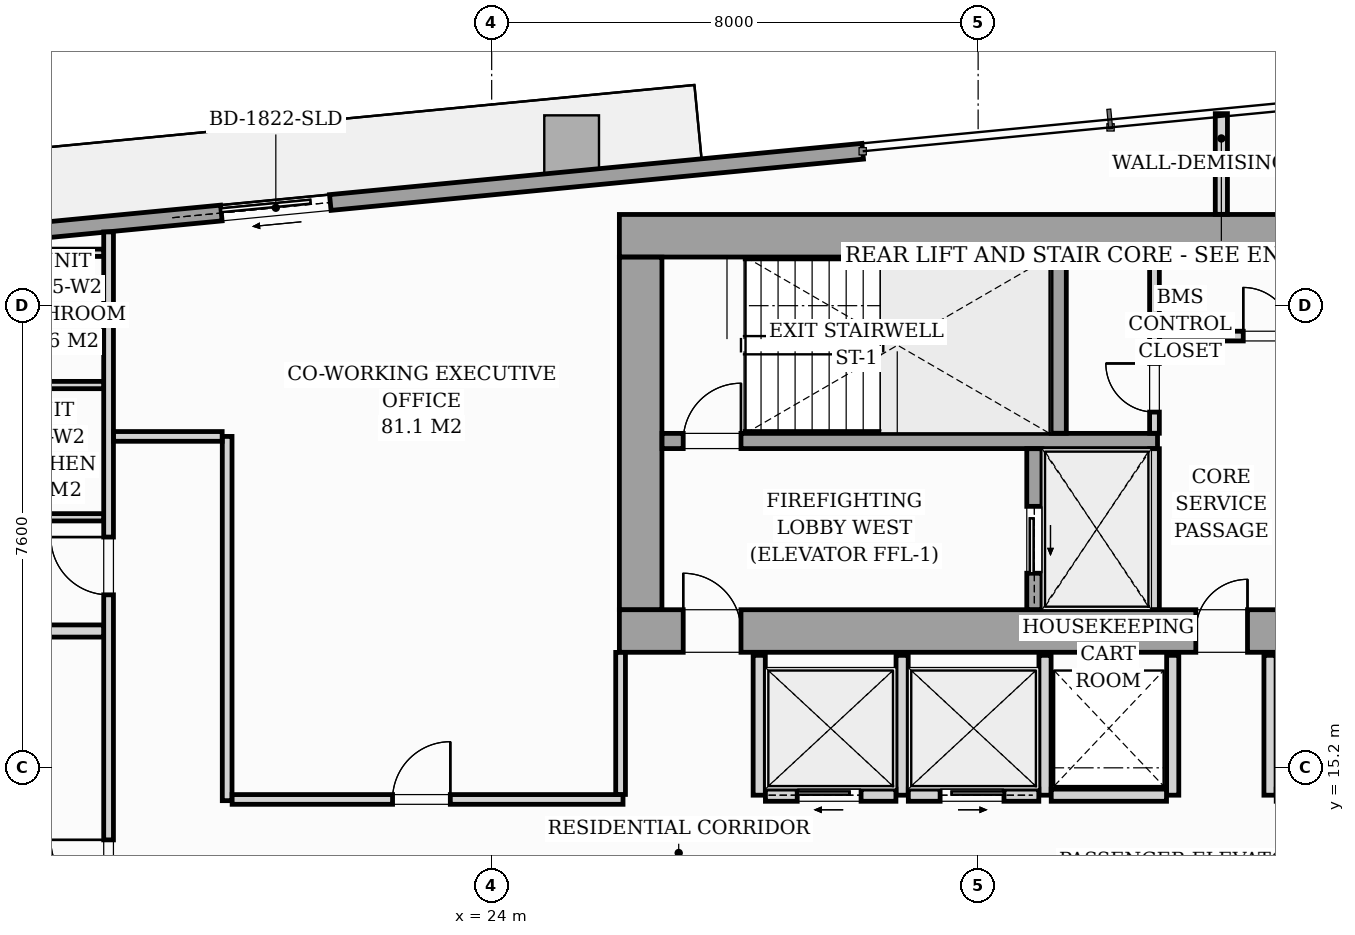
"""IFC4 building model, lengths in metres.
Left out: names, types, materials, properties, quantities, classifications, styles, units other than length and angle.
Written with IfcOpenShell. Run it as: python <this file> out.ifc"""

import sys

from ifc_helpers import new_model, si_unit, direction, frame, frame_2d, origin, origin_2d, place, context, subcontext, project, spatial, rectangle, i_section, extrude, source, transform, mapped, element, fill, save


model = new_model("IFC4")
c1 = context("Model", 3, precision=1e-05, world=origin(), true_north=direction((0.0, 1.0)))
c2 = subcontext(c1, "Body", "Model", "MODEL_VIEW")
j1 = project(units=[si_unit("LENGTHUNIT", "METRE"), si_unit("PLANEANGLEUNIT", "RADIAN")], contexts=[c1])
p1 = place(None, origin())
s1 = spatial("IfcSite", under=j1, at=p1, CompositionType="ELEMENT")
p2 = place(p1, origin())
s2 = spatial("IfcBuilding", under=s1, at=p2, CompositionType="ELEMENT")
p3 = place(p2, frame((0.0, 0.0, 90.6)))
s3 = spatial("IfcBuildingStorey", under=s2, at=p3, CompositionType="ELEMENT", Elevation=90.6)
m1 = source(origin(), c2, "Body", "SweptSolid", [
    extrude(i_section(OverallWidth=0.427, OverallDepth=0.483, WebThickness=0.051, FlangeThickness=0.082, FilletRadius=0.018, at=origin_2d()), origin(), (0.0, 0.0, 1.0), 3.196),
])
for number, where, z_axis, x_axis in (
    (1, (26.4, 17.4, 0.002), (0.0, 0.0, 1.0), (1.0, 0.0, 0.0)),
    (2, (33.12, 17.4, 0.002), (0.0, 0.0, 1.0), (1.0, 0.0, 0.0)),
    (3, (26.4, 24.0, 0.002), (0.0, 0.0, 1.0), (1.0, 0.0, 0.0)),
    (4, (33.12, 24.0, 0.002), (0.0, 0.0, 1.0), (1.0, 0.0, 0.0)),
):
    element("IfcColumn", number, at=place(p3, frame(where, z_axis=z_axis, x_axis=x_axis)), inside=s3, PredefinedType="PILASTER", context=c2, shape_type="MappedRepresentation", body=[
        mapped(m1, transform((0.0, 0.0, 0.0), scale=1.0)),
    ])
m2 = source(origin(), c2, "Body", "SweptSolid", [
    extrude(rectangle(XDim=0.9, YDim=1.1, at=origin_2d()), origin(), (0.0, 0.0, 1.0), 3.196),
])
p4 = place(p3, frame((25.315, 25.38, 0.002), z_axis=(0.0, 0.0, 1.0), x_axis=(0.995396198367, 0.09584575252, 0.0)))
e5 = element("IfcColumn", 5, at=p4, inside=s3, PredefinedType="COLUMN", context=c2, shape_type="MappedRepresentation", body=[
    mapped(m2, transform((0.0, 0.0, 0.0), scale=1.0)),
])
p5 = place(p3, frame((11.08, 23.508, 0.0), z_axis=(0.0, 0.0, 1.0), x_axis=(0.995396638587, 0.095841180552, 0.0)))
e6 = element("IfcWall", 6, at=p5, inside=s3, PredefinedType="STANDARD", context=c2, shape_type="SweptSolid", body=[
    extrude(rectangle(XDim=19.11, YDim=0.26, at=frame_2d((9.555, 0.0))), origin(), (0.0, 0.0, 1.0), 2.94),
])
p6 = place(p5, frame((8.514, 0.0, 0.0)))
e7 = element("IfcOpeningElement", 7, at=p6, cuts=e6, PredefinedType="OPENING", context=c2, shape_type="SweptSolid", body=[
    extrude(rectangle(XDim=1.8, YDim=2.06, at=frame_2d((0.9, 1.03))), frame((0.0, 0.14, 0.0), z_axis=(0.0, -1.0, 0.0), x_axis=(1.0, 0.0, 0.0)), (0.0, 0.0, 1.0), 0.28),
])
p7 = place(p5, frame((2.05, 0.0, 0.65)))
e8 = element("IfcOpeningElement", 8, at=p7, cuts=e6, PredefinedType="OPENING", context=c2, shape_type="SweptSolid", body=[
    extrude(rectangle(XDim=1.6, YDim=1.5, at=frame_2d((0.8, 0.75))), frame((0.0, 0.14, 0.0), z_axis=(0.0, -1.0, 0.0), x_axis=(1.0, 0.0, 0.0)), (0.0, 0.0, 1.0), 0.28),
])
p8 = place(p3, frame((26.1, 17.45, 0.0), z_axis=(0.0, 0.0, 1.0), x_axis=(1.0, 0.0, 0.0)))
e9 = element("IfcWall", 9, at=p8, inside=s3, PredefinedType="SHEAR", context=c2, shape_type="SweptSolid", body=[
    extrude(rectangle(XDim=19.8, YDim=0.7, at=frame_2d((9.9, 0.0))), origin(), (0.0, 0.0, 1.0), 3.2),
])
p9 = place(p8, frame((1.05, 0.0, 0.0)))
e10 = element("IfcOpeningElement", 10, at=p9, cuts=e9, PredefinedType="OPENING", context=c2, shape_type="SweptSolid", body=[
    extrude(rectangle(XDim=0.95, YDim=2.06, at=frame_2d((0.475, 1.03))), frame((0.0, 0.36, 0.0), z_axis=(0.0, -1.0, 0.0), x_axis=(1.0, 0.0, 0.0)), (0.0, 0.0, 1.0), 0.72),
])
p10 = place(p8, frame((9.48, 0.0, 0.0)))
e11 = element("IfcOpeningElement", 11, at=p10, cuts=e9, PredefinedType="OPENING", context=c2, shape_type="SweptSolid", body=[
    extrude(rectangle(XDim=0.85, YDim=2.0, at=frame_2d((0.425, 1.0))), frame((0.0, 0.36, 0.0), z_axis=(0.0, -1.0, 0.0), x_axis=(1.0, 0.0, 0.0)), (0.0, 0.0, 1.0), 0.72),
])
p11 = place(p8, frame((17.65, 0.0, 0.0)))
e12 = element("IfcOpeningElement", 12, at=p11, cuts=e9, PredefinedType="OPENING", context=c2, shape_type="SweptSolid", body=[
    extrude(rectangle(XDim=0.95, YDim=2.06, at=frame_2d((0.475, 1.03))), frame((0.0, 0.36, 0.0), z_axis=(0.0, -1.0, 0.0), x_axis=(1.0, 0.0, 0.0)), (0.0, 0.0, 1.0), 0.72),
])
p12 = place(p3, frame((26.1, 23.95, 0.0), z_axis=(0.0, 0.0, 1.0), x_axis=(1.0, 0.0, 0.0)))
e13 = element("IfcWall", 13, at=p12, inside=s3, PredefinedType="SHEAR", context=c2, shape_type="SweptSolid", body=[
    extrude(rectangle(XDim=19.8, YDim=0.7, at=frame_2d((9.9, 0.0))), origin(), (0.0, 0.0, 1.0), 3.2),
])
p13 = place(p3, frame((26.45, 17.802, 0.0), z_axis=(0.0, 0.0, 1.0), x_axis=(0.0, 1.0, 0.0)))
e14 = element("IfcWall", 14, at=p13, inside=s3, PredefinedType="SHEAR", context=c2, shape_type="SweptSolid", body=[
    extrude(rectangle(XDim=5.796, YDim=0.7, at=frame_2d((2.898, 0.0))), origin(), (0.0, 0.0, 1.0), 3.2),
])
p14 = place(p3, frame((26.802, 20.575, 0.0), z_axis=(0.0, 0.0, 1.0), x_axis=(1.0, 0.0, 0.0)))
e15 = element("IfcWall", 15, at=p14, inside=s3, PredefinedType="SOLIDWALL", context=c2, shape_type="SweptSolid", body=[
    extrude(rectangle(XDim=8.148, YDim=0.25, at=frame_2d((4.074, 0.0))), origin(), (0.0, 0.0, 1.0), 3.2),
])
p15 = place(p14, frame((0.348, 0.0, 0.0)))
e16 = element("IfcOpeningElement", 16, at=p15, cuts=e15, PredefinedType="OPENING", context=c2, shape_type="SweptSolid", body=[
    extrude(rectangle(XDim=0.95, YDim=2.06, at=frame_2d((0.475, 1.03))), frame((0.0, 0.135, 0.0), z_axis=(0.0, -1.0, 0.0), x_axis=(1.0, 0.0, 0.0)), (0.0, 0.0, 1.0), 0.27),
])
p16 = place(p3, frame((33.325, 20.702, 0.0), z_axis=(0.0, 0.0, 1.0), x_axis=(0.0, 1.0, 0.0)))
e17 = element("IfcWall", 17, at=p16, inside=s3, PredefinedType="SOLIDWALL", context=c2, shape_type="SweptSolid", body=[
    extrude(rectangle(XDim=2.896, YDim=0.25, at=frame_2d((1.448, 0.0))), origin(), (0.0, 0.0, 1.0), 3.2),
])
p17 = place(p3, frame((32.925, 17.802, 0.0), z_axis=(0.0, 0.0, 1.0), x_axis=(0.0, 1.0, 0.0)))
e18 = element("IfcWall", 18, at=p17, inside=s3, PredefinedType="SOLIDWALL", context=c2, shape_type="SweptSolid", body=[
    extrude(rectangle(XDim=2.646, YDim=0.25, at=frame_2d((1.323, 0.0))), origin(), (0.0, 0.0, 1.0), 3.2),
])
p18 = place(p17, frame((0.598, 0.0, 0.0)))
e19 = element("IfcOpeningElement", 19, at=p18, cuts=e18, PredefinedType="OPENING", context=c2, shape_type="SweptSolid", body=[
    extrude(rectangle(XDim=1.1, YDim=2.08, at=frame_2d((0.55, 1.04))), frame((0.0, 0.135, 0.0), z_axis=(0.0, -1.0, 0.0), x_axis=(1.0, 0.0, 0.0)), (0.0, 0.0, 1.0), 0.27),
])
p19 = place(p3, frame((34.9, 17.802, 0.0), z_axis=(0.0, 0.0, 1.0), x_axis=(0.0, 1.0, 0.0)))
e20 = element("IfcWall", 20, at=p19, inside=s3, PredefinedType="PARTITIONING", context=c2, shape_type="SweptSolid", body=[
    extrude(rectangle(XDim=2.646, YDim=0.16, at=frame_2d((1.323, 0.0))), origin(), (0.0, 0.0, 1.0), 2.94),
])
p20 = place(p3, frame((34.9, 20.702, 0.0), z_axis=(0.0, 0.0, 1.0), x_axis=(0.0, 1.0, 0.0)))
e21 = element("IfcWall", 21, at=p20, inside=s3, PredefinedType="PARTITIONING", context=c2, shape_type="SweptSolid", body=[
    extrude(rectangle(XDim=2.896, YDim=0.16, at=frame_2d((1.448, 0.0))), origin(), (0.0, 0.0, 1.0), 2.94),
])
p21 = place(p20, frame((0.348, 0.0, 0.0)))
e22 = element("IfcOpeningElement", 22, at=p21, cuts=e21, PredefinedType="OPENING", context=c2, shape_type="SweptSolid", body=[
    extrude(rectangle(XDim=0.8, YDim=2.05, at=frame_2d((0.4, 1.025))), frame((0.0, 0.09, 0.0), z_axis=(0.0, -1.0, 0.0), x_axis=(1.0, 0.0, 0.0)), (0.0, 0.0, 1.0), 0.18),
])
p22 = place(p3, frame((34.982, 22.3, 0.0), z_axis=(0.0, 0.0, 1.0), x_axis=(1.0, 0.0, 0.0)))
e23 = element("IfcWall", 23, at=p22, inside=s3, PredefinedType="PARTITIONING", context=c2, shape_type="SweptSolid", body=[
    extrude(rectangle(XDim=3.566, YDim=0.16, at=frame_2d((1.783, 0.0))), origin(), (0.0, 0.0, 1.0), 2.94),
])
p23 = place(p22, frame((1.378, 0.0, 0.0)))
e24 = element("IfcOpeningElement", 24, at=p23, cuts=e23, PredefinedType="OPENING", context=c2, shape_type="SweptSolid", body=[
    extrude(rectangle(XDim=0.8, YDim=2.05, at=frame_2d((0.4, 1.025))), frame((0.0, 0.09, 0.0), z_axis=(0.0, -1.0, 0.0), x_axis=(1.0, 0.0, 0.0)), (0.0, 0.0, 1.0), 0.18),
])
for number, where, z_axis, x_axis in (
    (25, (28.4, 14.75, 0.0), (0.0, 0.0, 1.0), (0.0, 1.0, 0.0)),
    (26, (30.75, 14.75, 0.0), (0.0, 0.0, 1.0), (0.0, 1.0, 0.0)),
    (27, (33.1, 14.75, 0.0), (0.0, 0.0, 1.0), (0.0, 1.0, 0.0)),
):
    element("IfcWall", number, at=place(p3, frame(where, z_axis=z_axis, x_axis=x_axis)), inside=s3, PredefinedType="PARTITIONING", context=c2, shape_type="SweptSolid", body=[
        extrude(rectangle(XDim=2.3, YDim=0.2, at=frame_2d((1.15, 0.0))), origin(), (0.0, 0.0, 1.0), 2.94),
    ])
p24 = place(p3, frame((28.502, 14.75, 0.0), z_axis=(0.0, 0.0, 1.0), x_axis=(1.0, 0.0, 0.0)))
e28 = element("IfcWall", 28, at=p24, inside=s3, PredefinedType="PARTITIONING", context=c2, shape_type="SweptSolid", body=[
    extrude(rectangle(XDim=2.146, YDim=0.2, at=frame_2d((1.073, 0.0))), origin(), (0.0, 0.0, 1.0), 2.94),
])
p25 = place(p24, frame((0.523, 0.0, 0.0)))
e29 = element("IfcOpeningElement", 29, at=p25, cuts=e28, PredefinedType="OPENING", context=c2, shape_type="SweptSolid", body=[
    extrude(rectangle(XDim=1.05, YDim=2.08, at=frame_2d((0.525, 1.04))), frame((0.0, 0.11, 0.0), z_axis=(0.0, -1.0, 0.0), x_axis=(1.0, 0.0, 0.0)), (0.0, 0.0, 1.0), 0.22),
])
p26 = place(p3, frame((30.852, 14.75, 0.0), z_axis=(0.0, 0.0, 1.0), x_axis=(1.0, 0.0, 0.0)))
e30 = element("IfcWall", 30, at=p26, inside=s3, PredefinedType="PARTITIONING", context=c2, shape_type="SweptSolid", body=[
    extrude(rectangle(XDim=2.146, YDim=0.2, at=frame_2d((1.073, 0.0))), origin(), (0.0, 0.0, 1.0), 2.94),
])
p27 = place(p26, frame((0.523, 0.0, 0.0)))
e31 = element("IfcOpeningElement", 31, at=p27, cuts=e30, PredefinedType="OPENING", context=c2, shape_type="SweptSolid", body=[
    extrude(rectangle(XDim=1.05, YDim=2.08, at=frame_2d((0.525, 1.04))), frame((0.0, 0.11, 0.0), z_axis=(0.0, -1.0, 0.0), x_axis=(1.0, 0.0, 0.0)), (0.0, 0.0, 1.0), 0.22),
])
p28 = place(p3, frame((35.2, 14.75, 0.0), z_axis=(0.0, 0.0, 1.0), x_axis=(0.0, 1.0, 0.0)))
e32 = element("IfcWall", 32, at=p28, inside=s3, PredefinedType="PARTITIONING", context=c2, shape_type="SweptSolid", body=[
    extrude(rectangle(XDim=2.3, YDim=0.2, at=frame_2d((1.15, 0.0))), origin(), (0.0, 0.0, 1.0), 2.94),
])
p29 = place(p3, frame((33.202, 14.75, 0.0), z_axis=(0.0, 0.0, 1.0), x_axis=(1.0, 0.0, 0.0)))
e33 = element("IfcWall", 33, at=p29, inside=s3, PredefinedType="PARTITIONING", context=c2, shape_type="SweptSolid", body=[
    extrude(rectangle(XDim=1.896, YDim=0.2, at=frame_2d((0.948, 0.0))), origin(), (0.0, 0.0, 1.0), 2.94),
])
p30 = place(p3, frame((36.8, 14.75, 0.0), z_axis=(0.0, 0.0, 1.0), x_axis=(0.0, 1.0, 0.0)))
e34 = element("IfcWall", 34, at=p30, inside=s3, PredefinedType="PARTITIONING", context=c2, shape_type="SweptSolid", body=[
    extrude(rectangle(XDim=2.3, YDim=0.2, at=frame_2d((1.15, 0.0))), origin(), (0.0, 0.0, 1.0), 2.94),
])
p31 = place(p3, frame((17.7, 12.572, 0.0), z_axis=(0.0, 0.0, 1.0), x_axis=(0.0, 1.0, 0.0)))
e35 = element("IfcWall", 35, at=p31, inside=s3, PredefinedType="PARTITIONING", context=c2, shape_type="SweptSolid", body=[
    extrude(rectangle(XDim=11.441, YDim=0.16, at=frame_2d((5.72, 0.0))), origin(), (0.0, 0.0, 1.0), 2.94),
])
p32 = place(p31, frame((0.493, 0.0, 0.0)))
e36 = element("IfcOpeningElement", 36, at=p32, cuts=e35, PredefinedType="OPENING", context=c2, shape_type="SweptSolid", body=[
    extrude(rectangle(XDim=0.95, YDim=2.06, at=frame_2d((0.475, 1.03))), frame((0.0, 0.09, 0.0), z_axis=(0.0, -1.0, 0.0), x_axis=(1.0, 0.0, 0.0)), (0.0, 0.0, 1.0), 0.18),
])
p33 = place(p31, frame((5.473, 0.0, 0.0)))
e37 = element("IfcOpeningElement", 37, at=p33, cuts=e35, PredefinedType="OPENING", context=c2, shape_type="SweptSolid", body=[
    extrude(rectangle(XDim=0.95, YDim=2.06, at=frame_2d((0.475, 1.03))), frame((0.0, 0.09, 0.0), z_axis=(0.0, -1.0, 0.0), x_axis=(1.0, 0.0, 0.0)), (0.0, 0.0, 1.0), 0.18),
])
p34 = place(p3, frame((36.0, 24.302, 0.0), z_axis=(0.0, 0.0, 1.0), x_axis=(0.0, 1.0, 0.0)))
e38 = element("IfcWall", 38, at=p34, inside=s3, PredefinedType="PARTITIONING", context=c2, shape_type="SweptSolid", body=[
    extrude(rectangle(XDim=1.656, YDim=0.2, at=frame_2d((0.828, 0.0))), origin(), (0.0, 0.0, 1.0), 2.94),
])
p35 = place(p3, frame((9.232, 17.45, 0.0), z_axis=(0.0, 0.0, 1.0), x_axis=(1.0, 0.0, 0.0)))
e39 = element("IfcWall", 39, at=p35, inside=s3, PredefinedType="PARTITIONING", context=c2, shape_type="SweptSolid", body=[
    extrude(rectangle(XDim=8.386, YDim=0.2, at=frame_2d((4.193, 0.0))), origin(), (0.0, 0.0, 1.0), 2.94),
])
for number, where, z_axis, x_axis in (
    (40, (15.362, 21.495, 0.0), (0.0, 0.0, 1.0), (1.0, 0.0, 0.0)),
    (41, (15.362, 19.32, 0.0), (0.0, 0.0, 1.0), (1.0, 0.0, 0.0)),
):
    element("IfcWall", number, at=place(p3, frame(where, z_axis=z_axis, x_axis=x_axis)), inside=s3, PredefinedType="PARTITIONING", context=c2, shape_type="SweptSolid", body=[
        extrude(rectangle(XDim=2.256, YDim=0.12, at=frame_2d((1.128, 0.0))), origin(), (0.0, 0.0, 1.0), 2.94),
    ])
p36 = place(p3, frame((15.362, 23.67, 0.0), z_axis=(0.0, 0.0, 1.0), x_axis=(1.0, 0.0, 0.0)))
e42 = element("IfcWall", 42, at=p36, inside=s3, PredefinedType="PARTITIONING", context=c2, shape_type="SweptSolid", body=[
    extrude(rectangle(XDim=2.256, YDim=0.12, at=frame_2d((1.128, 0.0))), origin(), (0.0, 0.0, 1.0), 2.31),
])
p37 = place(p3, frame((19.65, 14.66, 0.0), z_axis=(0.0, 0.0, 1.0), x_axis=(0.0, 1.0, 0.0)))
e43 = element("IfcWall", 43, at=p37, inside=s3, PredefinedType="PARTITIONING", context=c2, shape_type="SweptSolid", body=[
    extrude(rectangle(XDim=5.99, YDim=0.16, at=frame_2d((2.995, 0.0))), origin(), (0.0, 0.0, 1.0), 2.94),
])
p38 = place(p3, frame((17.782, 20.65, 0.0), z_axis=(0.0, 0.0, 1.0), x_axis=(1.0, 0.0, 0.0)))
e44 = element("IfcWall", 44, at=p38, inside=s3, PredefinedType="PARTITIONING", context=c2, shape_type="SweptSolid", body=[
    extrude(rectangle(XDim=1.786, YDim=0.16, at=frame_2d((0.893, 0.0))), origin(), (0.0, 0.0, 1.0), 2.94),
])
p39 = place(p3, frame((19.732, 14.68, 0.0), z_axis=(0.0, 0.0, 1.0), x_axis=(1.0, 0.0, 0.0)))
e45 = element("IfcWall", 45, at=p39, inside=s3, PredefinedType="PARTITIONING", context=c2, shape_type="SweptSolid", body=[
    extrude(rectangle(XDim=6.428, YDim=0.16, at=frame_2d((3.214, 0.0))), origin(), (0.0, 0.0, 1.0), 2.94),
])
p40 = place(p39, frame((2.638, 0.0, 0.0)))
e46 = element("IfcOpeningElement", 46, at=p40, cuts=e45, PredefinedType="OPENING", context=c2, shape_type="SweptSolid", body=[
    extrude(rectangle(XDim=0.95, YDim=2.06, at=frame_2d((0.475, 1.03))), frame((0.0, 0.09, 0.0), z_axis=(0.0, -1.0, 0.0), x_axis=(1.0, 0.0, 0.0)), (0.0, 0.0, 1.0), 0.18),
])
p41 = place(p3, frame((26.12, 14.762, 0.0), z_axis=(0.0, 0.0, 1.0), x_axis=(0.0, 1.0, 0.0)))
e47 = element("IfcWall", 47, at=p41, inside=s3, PredefinedType="PARTITIONING", context=c2, shape_type="SweptSolid", body=[
    extrude(rectangle(XDim=2.336, YDim=0.16, at=frame_2d((1.168, 0.0))), origin(), (0.0, 0.0, 1.0), 2.94),
])
m3 = source(origin(), c2, "Body", "SweptSolid", [
    extrude(rectangle(XDim=1.8, YDim=2.06, at=frame_2d((0.9, 1.03))), frame((0.0, 0.025, 0.0), z_axis=(0.0, -1.0, 0.0), x_axis=(1.0, 0.0, 0.0)), (0.0, 0.0, 1.0), 0.05),
])
p42 = place(p6, origin())
e48 = element("IfcDoor", 48, at=p42, inside=s3, OperationType="SLIDING_TO_LEFT", PredefinedType="DOOR", context=c2, shape_type="MappedRepresentation", body=[
    mapped(m3, transform((0.0, 0.0, 0.0), scale=1.0)),
])
fill(e7, e48)
m4 = source(origin(), c2, "Body", "SweptSolid", [
    extrude(rectangle(XDim=0.95, YDim=2.06, at=frame_2d((0.475, 1.03))), frame((0.0, 0.025, 0.0), z_axis=(0.0, -1.0, 0.0), x_axis=(1.0, 0.0, 0.0)), (0.0, 0.0, 1.0), 0.05),
])
p43 = place(p9, origin())
e49 = element("IfcDoor", 49, at=p43, inside=s3, OperationType="SINGLE_SWING_LEFT", PredefinedType="DOOR", context=c2, shape_type="MappedRepresentation", body=[
    mapped(m4, transform((0.0, 0.0, 0.0), scale=1.0)),
])
fill(e10, e49)
m5 = source(origin(), c2, "Body", "SweptSolid", [
    extrude(rectangle(XDim=0.85, YDim=2.0, at=frame_2d((0.425, 1.0))), frame((0.0, 0.025, 0.0), z_axis=(0.0, -1.0, 0.0), x_axis=(1.0, 0.0, 0.0)), (0.0, 0.0, 1.0), 0.05),
])
p44 = place(p10, origin())
e50 = element("IfcDoor", 50, at=p44, inside=s3, OperationType="SINGLE_SWING_RIGHT", PredefinedType="DOOR", context=c2, shape_type="MappedRepresentation", body=[
    mapped(m5, transform((0.0, 0.0, 0.0), scale=1.0)),
])
fill(e11, e50)
p45 = place(p15, origin())
e51 = element("IfcDoor", 51, at=p45, inside=s3, OperationType="SINGLE_SWING_RIGHT", PredefinedType="DOOR", context=c2, shape_type="MappedRepresentation", body=[
    mapped(m4, transform((0.0, 0.0, 0.0), scale=1.0)),
])
fill(e16, e51)
m6 = source(origin(), c2, "Body", "SweptSolid", [
    extrude(rectangle(XDim=1.1, YDim=2.08, at=frame_2d((0.55, 1.04))), frame((0.0, 0.025, 0.0), z_axis=(0.0, -1.0, 0.0), x_axis=(1.0, 0.0, 0.0)), (0.0, 0.0, 1.0), 0.05),
])
p46 = place(p18, origin())
e52 = element("IfcDoor", 52, at=p46, inside=s3, OperationType="SLIDING_TO_LEFT", PredefinedType="DOOR", context=c2, shape_type="MappedRepresentation", body=[
    mapped(m6, transform((0.0, 0.0, 0.0), scale=1.0)),
])
fill(e19, e52)
m7 = source(origin(), c2, "Body", "SweptSolid", [
    extrude(rectangle(XDim=0.8, YDim=2.05, at=frame_2d((0.4, 1.025))), frame((0.0, 0.025, 0.0), z_axis=(0.0, -1.0, 0.0), x_axis=(1.0, 0.0, 0.0)), (0.0, 0.0, 1.0), 0.05),
])
p47 = place(p21, origin())
e53 = element("IfcDoor", 53, at=p47, inside=s3, OperationType="SINGLE_SWING_RIGHT", PredefinedType="DOOR", context=c2, shape_type="MappedRepresentation", body=[
    mapped(m7, transform((0.0, 0.0, 0.0), scale=1.0)),
])
fill(e22, e53)
p48 = place(p23, origin())
e54 = element("IfcDoor", 54, at=p48, inside=s3, OperationType="SINGLE_SWING_LEFT", PredefinedType="DOOR", context=c2, shape_type="MappedRepresentation", body=[
    mapped(m7, transform((0.0, 0.0, 0.0), scale=1.0)),
])
fill(e24, e54)
m8 = source(origin(), c2, "Body", "SweptSolid", [
    extrude(rectangle(XDim=1.05, YDim=2.08, at=frame_2d((0.525, 1.04))), frame((0.0, 0.025, 0.0), z_axis=(0.0, -1.0, 0.0), x_axis=(1.0, 0.0, 0.0)), (0.0, 0.0, 1.0), 0.05),
])
p49 = place(p25, origin())
e55 = element("IfcDoor", 55, at=p49, inside=s3, OperationType="SLIDING_TO_LEFT", PredefinedType="DOOR", context=c2, shape_type="MappedRepresentation", body=[
    mapped(m8, transform((0.0, 0.0, 0.0), scale=1.0)),
])
fill(e29, e55)
p50 = place(p27, origin())
e56 = element("IfcDoor", 56, at=p50, inside=s3, OperationType="SLIDING_TO_RIGHT", PredefinedType="DOOR", context=c2, shape_type="MappedRepresentation", body=[
    mapped(m8, transform((0.0, 0.0, 0.0), scale=1.0)),
])
fill(e31, e56)
m9 = source(origin(), c2, "Body", "SweptSolid", [
    extrude(rectangle(XDim=0.95, YDim=2.06, at=frame_2d((0.475, 1.03))), frame((0.0, 0.025, 0.0), z_axis=(0.0, -1.0, 0.0), x_axis=(1.0, 0.0, 0.0)), (0.0, 0.0, 1.0), 0.05),
])
p51 = place(p32, origin())
e57 = element("IfcDoor", 57, at=p51, inside=s3, OperationType="SINGLE_SWING_RIGHT", PredefinedType="DOOR", context=c2, shape_type="MappedRepresentation", body=[
    mapped(m9, transform((0.0, 0.0, 0.0), scale=1.0)),
])
fill(e36, e57)
p52 = place(p33, origin())
e58 = element("IfcDoor", 58, at=p52, inside=s3, OperationType="SINGLE_SWING_RIGHT", PredefinedType="DOOR", context=c2, shape_type="MappedRepresentation", body=[
    mapped(m9, transform((0.0, 0.0, 0.0), scale=1.0)),
])
fill(e37, e58)
p53 = place(p40, origin())
e59 = element("IfcDoor", 59, at=p53, inside=s3, OperationType="SINGLE_SWING_RIGHT", PredefinedType="DOOR", context=c2, shape_type="MappedRepresentation", body=[
    mapped(m9, transform((0.0, 0.0, 0.0), scale=1.0)),
])
fill(e46, e59)
save(model, sys.argv[1])
